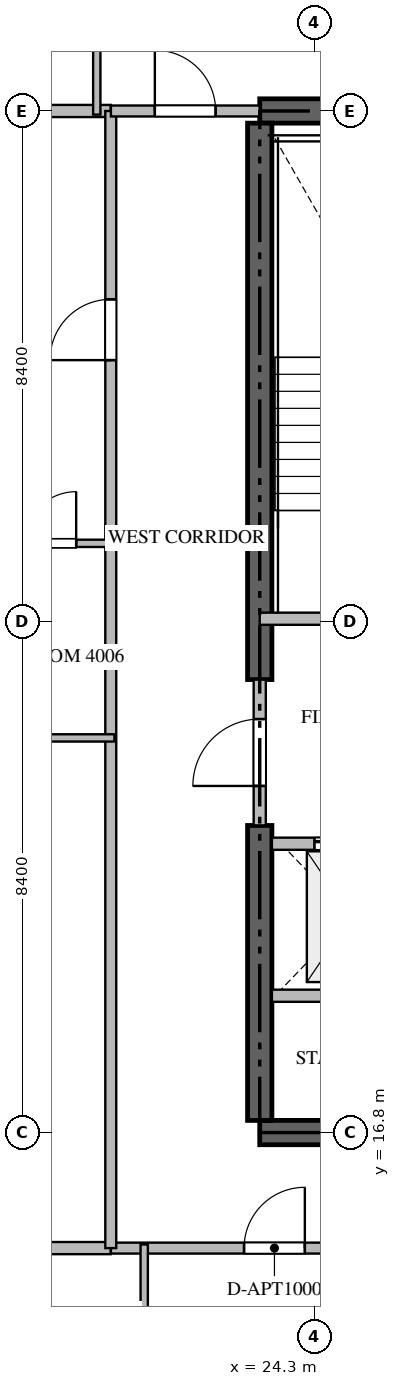
"""IFC4 building model, lengths in metres.
Left out: names, types, materials, properties, quantities, classifications, styles, units other than length and angle.
Written with IfcOpenShell. Run it as: python <this file> out.ifc"""

import sys

from ifc_helpers import new_model, si_unit, direction, frame, frame_2d, origin, place, context, subcontext, project, spatial, rectangle, extrude, source, transform, mapped, element, fill, save


model = new_model("IFC4")
c1 = context("Model", 3, precision=1e-05, world=origin(), true_north=direction((0.0, 1.0)))
c2 = subcontext(c1, "Body", "Model", "MODEL_VIEW")
j1 = project(units=[si_unit("LENGTHUNIT", "METRE"), si_unit("PLANEANGLEUNIT", "RADIAN")], contexts=[c1])
p1 = place(None, origin())
s1 = spatial("IfcSite", under=j1, at=p1, CompositionType="ELEMENT")
p2 = place(p1, origin())
s2 = spatial("IfcBuilding", under=s1, at=p2, CompositionType="ELEMENT")
p3 = place(p2, frame((0.0, 0.0, 161.4)))
s3 = spatial("IfcBuildingStorey", under=s2, at=p3, CompositionType="ELEMENT", Elevation=161.4)
for number, where, z_axis, x_axis in (
    (1, (23.4, 16.8, -0.26), (0.0, 0.0, 1.0), (1.0, 0.0, 0.0)),
    (2, (41.4, 33.6, -0.26), (0.0, 0.0, 1.0), (-1.0, 0.0, 0.0)),
):
    element("IfcWall", number, at=place(p3, frame(where, z_axis=z_axis, x_axis=x_axis)), inside=s3, PredefinedType="SHEAR", context=c2, shape_type="SweptSolid", body=[
        extrude(rectangle(XDim=18.0, YDim=0.4, at=frame_2d((9.0, 0.0))), origin(), (0.0, 0.0, 1.0), 3.748),
    ])
p4 = place(p3, frame((23.4, 17.0, -0.26), z_axis=(0.0, 0.0, 1.0), x_axis=(0.0, 1.0, 0.0)))
e3 = element("IfcWall", 3, at=p4, inside=s3, PredefinedType="SHEAR", context=c2, shape_type="SweptSolid", body=[
    extrude(rectangle(XDim=4.85, YDim=0.4, at=frame_2d((2.425, 0.0))), origin(), (0.0, 0.0, 1.0), 3.748),
])
p5 = place(p3, frame((23.4, 24.25, -0.26), z_axis=(0.0, 0.0, 1.0), x_axis=(0.0, 1.0, 0.0)))
e4 = element("IfcWall", 4, at=p5, inside=s3, PredefinedType="SHEAR", context=c2, shape_type="SweptSolid", body=[
    extrude(rectangle(XDim=9.15, YDim=0.4, at=frame_2d((4.575, 0.0))), origin(), (0.0, 0.0, 1.0), 3.748),
])
p6 = place(p3, frame((23.4, 25.25, 0.0), z_axis=(0.0, 0.0, 1.0), x_axis=(1.0, 0.0, 0.0)))
e5 = element("IfcWall", 5, at=p6, inside=s3, PredefinedType="STANDARD", context=c2, shape_type="SweptSolid", body=[
    extrude(rectangle(XDim=4.45, YDim=0.2, at=frame_2d((2.225, 0.0))), origin(), (0.0, 0.0, 1.0), 3.49),
])
p7 = place(p6, frame((1.65, 0.0, 0.0)))
e6 = element("IfcOpeningElement", 6, at=p7, cuts=e5, PredefinedType="OPENING", context=c2, shape_type="SweptSolid", body=[
    extrude(rectangle(XDim=1.1, YDim=2.15, at=frame_2d((0.55, 1.075))), frame((0.0, 0.11, 0.0), z_axis=(0.0, -1.0, 0.0), x_axis=(1.0, 0.0, 0.0)), (0.0, 0.0, 1.0), 0.22),
])
p8 = place(p3, frame((23.6, 21.55, 0.0), z_axis=(0.0, 0.0, 1.0), x_axis=(1.0, 0.0, 0.0)))
e7 = element("IfcWall", 7, at=p8, inside=s3, PredefinedType="STANDARD", context=c2, shape_type="SweptSolid", body=[
    extrude(rectangle(XDim=2.45, YDim=0.2, at=frame_2d((1.225, 0.0))), origin(), (0.0, 0.0, 1.0), 3.49),
])
p9 = place(p8, frame((0.7, 0.0, 0.0)))
e8 = element("IfcOpeningElement", 8, at=p9, cuts=e7, PredefinedType="OPENING", context=c2, shape_type="SweptSolid", body=[
    extrude(rectangle(XDim=1.2, YDim=2.2, at=frame_2d((0.6, 1.1))), frame((0.0, 0.11, 0.0), z_axis=(0.0, -1.0, 0.0), x_axis=(1.0, 0.0, 0.0)), (0.0, 0.0, 1.0), 0.22),
])
p10 = place(p3, frame((23.6, 19.05, 0.0), z_axis=(0.0, 0.0, 1.0), x_axis=(1.0, 0.0, 0.0)))
e9 = element("IfcWall", 9, at=p10, inside=s3, PredefinedType="STANDARD", context=c2, shape_type="SweptSolid", body=[
    extrude(rectangle(XDim=2.45, YDim=0.2, at=frame_2d((1.225, 0.0))), origin(), (0.0, 0.0, 1.0), 3.49),
])
p11 = place(p3, frame((23.4, 21.852, 0.0), z_axis=(0.0, 0.0, 1.0), x_axis=(0.0, 1.0, 0.0)))
e10 = element("IfcWall", 10, at=p11, inside=s3, PredefinedType="STANDARD", context=c2, shape_type="SweptSolid", body=[
    extrude(rectangle(XDim=2.396, YDim=0.2, at=frame_2d((1.198, 0.0))), origin(), (0.0, 0.0, 1.0), 3.49),
])
p12 = place(p11, frame((0.648, 0.0, 0.0)))
e11 = element("IfcOpeningElement", 11, at=p12, cuts=e10, PredefinedType="OPENING", context=c2, shape_type="SweptSolid", body=[
    extrude(rectangle(XDim=1.1, YDim=2.15, at=frame_2d((0.55, 1.075))), frame((0.0, 0.11, 0.0), z_axis=(0.0, -1.0, 0.0), x_axis=(1.0, 0.0, 0.0)), (0.0, 0.0, 1.0), 0.22),
])
for number, where, z_axis, x_axis in (
    (12, (7.882, 14.9, 0.0), (0.0, 0.0, 1.0), (1.0, 0.0, 0.0)),
    (13, (7.882, 33.6, 0.0), (0.0, 0.0, 1.0), (1.0, 0.0, 0.0)),
):
    element("IfcWall", number, at=place(p3, frame(where, z_axis=z_axis, x_axis=x_axis)), inside=s3, PredefinedType="PARTITIONING", context=c2, shape_type="SweptSolid", body=[
        extrude(rectangle(XDim=13.068, YDim=0.2, at=frame_2d((6.534, 0.0))), origin(), (0.0, 0.0, 1.0), 3.49),
    ])
p13 = place(p3, frame((20.952, 14.9, 0.0), z_axis=(0.0, 0.0, 1.0), x_axis=(1.0, 0.0, 0.0)))
e14 = element("IfcWall", 14, at=p13, inside=s3, PredefinedType="PARTITIONING", context=c2, shape_type="SweptSolid", body=[
    extrude(rectangle(XDim=22.896, YDim=0.18, at=frame_2d((11.448, 0.0))), origin(), (0.0, 0.0, 1.0), 3.49),
])
p14 = place(p13, frame((2.19, 0.0, 0.0)))
e15 = element("IfcOpeningElement", 15, at=p14, cuts=e14, PredefinedType="OPENING", context=c2, shape_type="SweptSolid", body=[
    extrude(rectangle(XDim=1.0, YDim=2.15, at=frame_2d((0.5, 1.075))), frame((0.0, 0.1, 0.0), z_axis=(0.0, -1.0, 0.0), x_axis=(1.0, 0.0, 0.0)), (0.0, 0.0, 1.0), 0.2),
])
p15 = place(p13, frame((15.24, 0.0, 0.0)))
e16 = element("IfcOpeningElement", 16, at=p15, cuts=e14, PredefinedType="OPENING", context=c2, shape_type="SweptSolid", body=[
    extrude(rectangle(XDim=1.0, YDim=2.15, at=frame_2d((0.5, 1.075))), frame((0.0, 0.1, 0.0), z_axis=(0.0, -1.0, 0.0), x_axis=(1.0, 0.0, 0.0)), (0.0, 0.0, 1.0), 0.2),
])
p16 = place(p13, frame((19.706, 0.0, 0.0)))
e17 = element("IfcOpeningElement", 17, at=p16, cuts=e14, PredefinedType="OPENING", context=c2, shape_type="SweptSolid", body=[
    extrude(rectangle(XDim=1.0, YDim=2.15, at=frame_2d((0.5, 1.075))), frame((0.0, 0.1, 0.0), z_axis=(0.0, -1.0, 0.0), x_axis=(1.0, 0.0, 0.0)), (0.0, 0.0, 1.0), 0.2),
])
p17 = place(p3, frame((20.95, 14.9, 0.0), z_axis=(0.0, 0.0, 1.0), x_axis=(0.0, 1.0, 0.0)))
e18 = element("IfcWall", 18, at=p17, inside=s3, PredefinedType="PARTITIONING", context=c2, shape_type="SweptSolid", body=[
    extrude(rectangle(XDim=18.7, YDim=0.18, at=frame_2d((9.35, 0.0))), origin(), (0.0, 0.0, 1.0), 3.49),
])
p18 = place(p17, frame((14.603, 0.0, 0.0)))
e19 = element("IfcOpeningElement", 19, at=p18, cuts=e18, PredefinedType="OPENING", context=c2, shape_type="SweptSolid", body=[
    extrude(rectangle(XDim=1.0, YDim=2.15, at=frame_2d((0.5, 1.075))), frame((0.0, 0.1, 0.0), z_axis=(0.0, -1.0, 0.0), x_axis=(1.0, 0.0, 0.0)), (0.0, 0.0, 1.0), 0.2),
])
p19 = place(p3, frame((20.952, 33.6, 0.0), z_axis=(0.0, 0.0, 1.0), x_axis=(1.0, 0.0, 0.0)))
e20 = element("IfcWall", 20, at=p19, inside=s3, PredefinedType="PARTITIONING", context=c2, shape_type="SweptSolid", body=[
    extrude(rectangle(XDim=2.446, YDim=0.18, at=frame_2d((1.223, 0.0))), origin(), (0.0, 0.0, 1.0), 3.49),
])
p20 = place(p19, frame((0.723, 0.0, 0.0)))
e21 = element("IfcOpeningElement", 21, at=p20, cuts=e20, PredefinedType="OPENING", context=c2, shape_type="SweptSolid", body=[
    extrude(rectangle(XDim=1.0, YDim=2.15, at=frame_2d((0.5, 1.075))), frame((0.0, 0.1, 0.0), z_axis=(0.0, -1.0, 0.0), x_axis=(1.0, 0.0, 0.0)), (0.0, 0.0, 1.0), 0.2),
])
for number, where, z_axis, x_axis in (
    (22, (21.5, 12.15, 0.0), (0.0, 0.0, 1.0), (0.0, 1.0, 0.0)),
    (23, (20.72, 36.35, 0.0), (0.0, 0.0, 1.0), (0.0, -1.0, 0.0)),
):
    element("IfcWall", number, at=place(p3, frame(where, z_axis=z_axis, x_axis=x_axis)), inside=s3, PredefinedType="PARTITIONING", context=c2, shape_type="SweptSolid", body=[
        extrude(rectangle(XDim=2.81, YDim=0.12, at=frame_2d((1.405, 0.0))), origin(), (0.0, 0.0, 1.0), 3.49),
    ])
p21 = place(p3, frame((18.9, 23.29, 0.0), z_axis=(0.0, 0.0, 1.0), x_axis=(1.0, 0.0, 0.0)))
e24 = element("IfcWall", 24, at=p21, inside=s3, PredefinedType="PARTITIONING", context=c2, shape_type="SweptSolid", body=[
    extrude(rectangle(XDim=2.11, YDim=0.12, at=frame_2d((1.055, 0.0))), origin(), (0.0, 0.0, 1.0), 3.49),
])
p22 = place(p3, frame((18.902, 26.49, 0.0), z_axis=(0.0, 0.0, 1.0), x_axis=(1.0, 0.0, 0.0)))
e25 = element("IfcWall", 25, at=p22, inside=s3, PredefinedType="PARTITIONING", context=c2, shape_type="SweptSolid", body=[
    extrude(rectangle(XDim=2.108, YDim=0.12, at=frame_2d((1.054, 0.0))), origin(), (0.0, 0.0, 1.0), 3.49),
])
p23 = place(p22, frame((0.629, 0.0, 0.0)))
e26 = element("IfcOpeningElement", 26, at=p23, cuts=e25, PredefinedType="OPENING", context=c2, shape_type="SweptSolid", body=[
    extrude(rectangle(XDim=0.85, YDim=2.1, at=frame_2d((0.425, 1.05))), frame((0.0, 0.07, 0.0), z_axis=(0.0, -1.0, 0.0), x_axis=(1.0, 0.0, 0.0)), (0.0, 0.0, 1.0), 0.14),
])
m1 = source(origin(), c2, "Body", "SweptSolid", [
    extrude(rectangle(XDim=1.2, YDim=2.2, at=frame_2d((0.6, 1.1))), frame((0.0, 0.025, 0.0), z_axis=(0.0, -1.0, 0.0), x_axis=(1.0, 0.0, 0.0)), (0.0, 0.0, 1.0), 0.05),
])
p24 = place(p9, origin())
e27 = element("IfcDoor", 27, at=p24, inside=s3, OperationType="DOUBLE_DOOR_SLIDING", PredefinedType="DOOR", context=c2, shape_type="MappedRepresentation", body=[
    mapped(m1, transform((0.0, 0.0, 0.0), scale=1.0)),
])
fill(e8, e27)
m2 = source(origin(), c2, "Body", "SweptSolid", [
    extrude(rectangle(XDim=1.1, YDim=2.15, at=frame_2d((0.55, 1.075))), frame((0.0, 0.025, 0.0), z_axis=(0.0, -1.0, 0.0), x_axis=(1.0, 0.0, 0.0)), (0.0, 0.0, 1.0), 0.05),
])
p25 = place(p12, origin())
e28 = element("IfcDoor", 28, at=p25, inside=s3, OperationType="SINGLE_SWING_LEFT", PredefinedType="DOOR", context=c2, shape_type="MappedRepresentation", body=[
    mapped(m2, transform((0.0, 0.0, 0.0), scale=1.0)),
])
fill(e11, e28)
m3 = source(origin(), c2, "Body", "SweptSolid", [
    extrude(rectangle(XDim=1.0, YDim=2.15, at=frame_2d((0.5, 1.075))), frame((0.0, 0.025, 0.0), z_axis=(0.0, -1.0, 0.0), x_axis=(1.0, 0.0, 0.0)), (0.0, 0.0, 1.0), 0.05),
])
p26 = place(p14, origin())
e29 = element("IfcDoor", 29, at=p26, inside=s3, OperationType="SINGLE_SWING_RIGHT", PredefinedType="DOOR", context=c2, shape_type="MappedRepresentation", body=[
    mapped(m3, transform((0.0, 0.0, 0.0), scale=1.0)),
])
fill(e15, e29)
p27 = place(p18, origin())
e30 = element("IfcDoor", 30, at=p27, inside=s3, OperationType="SINGLE_SWING_LEFT", PredefinedType="DOOR", context=c2, shape_type="MappedRepresentation", body=[
    mapped(m3, transform((0.0, 0.0, 0.0), scale=1.0)),
])
fill(e19, e30)
p28 = place(p20, origin())
e31 = element("IfcDoor", 31, at=p28, inside=s3, OperationType="SINGLE_SWING_LEFT", PredefinedType="DOOR", context=c2, shape_type="MappedRepresentation", body=[
    mapped(m3, transform((0.0, 0.0, 0.0), scale=1.0)),
])
fill(e21, e31)
m4 = source(origin(), c2, "Body", "SweptSolid", [
    extrude(rectangle(XDim=0.85, YDim=2.1, at=frame_2d((0.425, 1.05))), frame((0.0, 0.025, 0.0), z_axis=(0.0, -1.0, 0.0), x_axis=(1.0, 0.0, 0.0)), (0.0, 0.0, 1.0), 0.05),
])
p29 = place(p23, origin())
e32 = element("IfcDoor", 32, at=p29, inside=s3, OperationType="SINGLE_SWING_RIGHT", PredefinedType="DOOR", context=c2, shape_type="MappedRepresentation", body=[
    mapped(m4, transform((0.0, 0.0, 0.0), scale=1.0)),
])
fill(e26, e32)
save(model, sys.argv[1])
